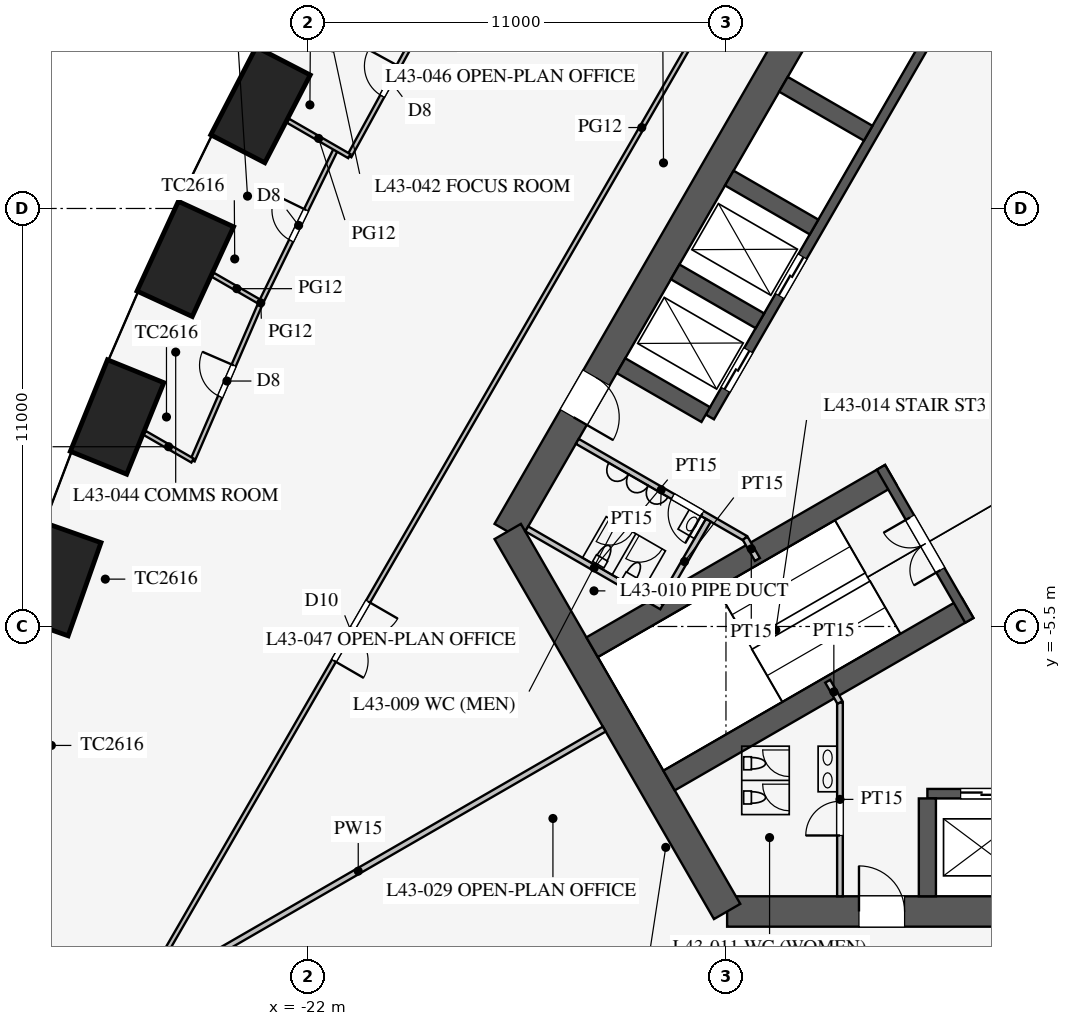
"""IFC4 building model, lengths in metres.
Left out: names, types, materials, properties, quantities, classifications, styles, units other than length and angle.
Written with IfcOpenShell. Run it as: python <this file> out.ifc"""

import sys

from ifc_helpers import new_model, si_unit, direction, frame, frame_2d, origin, origin_2d, place, context, subcontext, project, spatial, rectangle, extrude, element, fill, save


model = new_model("IFC4")
c1 = context("Model", 3, precision=1e-05, world=origin(), true_north=direction((0.0, 1.0)))
c2 = subcontext(c1, "Body", "Model", "MODEL_VIEW")
j1 = project(units=[si_unit("LENGTHUNIT", "METRE"), si_unit("PLANEANGLEUNIT", "RADIAN")], contexts=[c1])
p1 = place(None, origin())
s1 = spatial("IfcSite", under=j1, at=p1, CompositionType="ELEMENT")
p2 = place(p1, origin())
s2 = spatial("IfcBuilding", under=s1, at=p2, CompositionType="ELEMENT")
p3 = place(p2, frame((0.0, 0.0, 189.7)))
s3 = spatial("IfcBuildingStorey", under=s2, at=p3, CompositionType="ELEMENT", Elevation=189.7)
for number, where, z_axis, x_axis in (
    (1, (-23.248, 8.226, 0.0), (0.0, 0.0, 1.0), (-0.46, -0.888, 0.0)),
    (2, (-25.227, 4.172, 0.0), (0.0, 0.0, 1.0), (-0.418, -0.908, 0.0)),
    (3, (-27.022, 0.013, 0.0), (0.0, 0.0, 1.0), (-0.376, -0.927, 0.0)),
    (4, (-28.632, -4.254, 0.0), (0.0, 0.0, 1.0), (-0.332, -0.943, 0.0)),
):
    element("IfcColumn", number, at=place(p3, frame(where, z_axis=z_axis, x_axis=x_axis)), inside=s3, PredefinedType="COLUMN", context=c2, shape_type="SweptSolid", body=[
        extrude(rectangle(XDim=2.6, YDim=1.6, at=origin_2d()), origin(), (0.0, 0.0, 1.0), 4.2),
    ])
p4 = place(p3, frame((-10.97, -13.0, 0.0), z_axis=(0.0, 0.0, 1.0), x_axis=(1.0, 0.0, 0.0)))
e5 = element("IfcWall", 5, at=p4, inside=s3, PredefinedType="SHEAR", context=c2, shape_type="SweptSolid", body=[
    extrude(rectangle(XDim=21.939, YDim=0.8, at=frame_2d((10.97, 0.0))), origin(), (0.0, 0.0, 1.0), 4.2),
])
p5 = place(p4, frame((17.27, 0.0, 0.0)))
e6 = element("IfcOpeningElement", 6, at=p5, cuts=e5, PredefinedType="OPENING", context=c2, shape_type="SweptSolid", body=[
    extrude(rectangle(XDim=1.2, YDim=2.1, at=frame_2d((0.6, 1.05))), frame((0.0, 0.41, 0.0), z_axis=(0.0, -1.0, 0.0), x_axis=(1.0, 0.0, 0.0)), (0.0, 0.0, 1.0), 0.82),
])
p6 = place(p4, frame((3.47, 0.0, 0.0)))
e7 = element("IfcOpeningElement", 7, at=p6, cuts=e5, PredefinedType="OPENING", context=c2, shape_type="SweptSolid", body=[
    extrude(rectangle(XDim=1.2, YDim=2.1, at=frame_2d((0.6, 1.05))), frame((0.0, 0.41, 0.0), z_axis=(0.0, -1.0, 0.0), x_axis=(1.0, 0.0, 0.0)), (0.0, 0.0, 1.0), 0.82),
])
p7 = place(p3, frame((-5.773, 16.0, 0.0), z_axis=(0.0, 0.0, 1.0), x_axis=(-0.500002442456, -0.866023993627, 0.0)))
e8 = element("IfcWall", 8, at=p7, inside=s3, PredefinedType="SHEAR", context=c2, shape_type="SweptSolid", body=[
    extrude(rectangle(XDim=21.939, YDim=0.8, at=frame_2d((10.97, 0.0))), origin(), (0.0, 0.0, 1.0), 4.2),
])
p8 = place(p7, frame((17.27, 0.0, 0.0)))
e9 = element("IfcOpeningElement", 9, at=p8, cuts=e8, PredefinedType="OPENING", context=c2, shape_type="SweptSolid", body=[
    extrude(rectangle(XDim=1.2, YDim=2.1, at=frame_2d((0.6, 1.05))), frame((0.0, 0.41, 0.0), z_axis=(0.0, -1.0, 0.0), x_axis=(1.0, 0.0, 0.0)), (0.0, 0.0, 1.0), 0.82),
])
p9 = place(p7, frame((3.47, 0.0, 0.0)))
e10 = element("IfcOpeningElement", 10, at=p9, cuts=e8, PredefinedType="OPENING", context=c2, shape_type="SweptSolid", body=[
    extrude(rectangle(XDim=1.2, YDim=2.1, at=frame_2d((0.6, 1.05))), frame((0.0, 0.41, 0.0), z_axis=(0.0, -1.0, 0.0), x_axis=(1.0, 0.0, 0.0)), (0.0, 0.0, 1.0), 0.82),
])
p10 = place(p3, frame((-16.743, -3.0, 0.0), z_axis=(0.0, 0.0, 1.0), x_axis=(0.499995765644, -0.866027848477, 0.0)))
e11 = element("IfcWall", 11, at=p10, inside=s3, PredefinedType="SHEAR", context=c2, shape_type="SweptSolid", body=[
    extrude(rectangle(XDim=11.547, YDim=0.8, at=frame_2d((5.773, 0.0))), origin(), (0.0, 0.0, 1.0), 4.2),
])
p11 = place(p3, frame((-5.7, -9.9, 0.0), z_axis=(0.0, 0.0, 1.0), x_axis=(1.0, 0.0, 0.0)))
e12 = element("IfcWall", 12, at=p11, inside=s3, PredefinedType="SHEAR", context=c2, shape_type="SweptSolid", body=[
    extrude(rectangle(XDim=11.4, YDim=0.25, at=frame_2d((5.7, 0.0))), origin(), (0.0, 0.0, 1.0), 4.2),
])
p12 = place(p11, frame((0.875, 0.0, 0.0)))
e13 = element("IfcOpeningElement", 13, at=p12, cuts=e12, PredefinedType="OPENING", context=c2, shape_type="SweptSolid", body=[
    extrude(rectangle(XDim=1.1, YDim=2.2, at=frame_2d((0.55, 1.1))), frame((0.0, 0.135, 0.0), z_axis=(0.0, -1.0, 0.0), x_axis=(1.0, 0.0, 0.0)), (0.0, 0.0, 1.0), 0.27),
])
p13 = place(p11, frame((3.725, 0.0, 0.0)))
e14 = element("IfcOpeningElement", 14, at=p13, cuts=e12, PredefinedType="OPENING", context=c2, shape_type="SweptSolid", body=[
    extrude(rectangle(XDim=1.1, YDim=2.2, at=frame_2d((0.55, 1.1))), frame((0.0, 0.135, 0.0), z_axis=(0.0, -1.0, 0.0), x_axis=(1.0, 0.0, 0.0)), (0.0, 0.0, 1.0), 0.27),
])
p14 = place(p11, frame((6.575, 0.0, 0.0)))
e15 = element("IfcOpeningElement", 15, at=p14, cuts=e12, PredefinedType="OPENING", context=c2, shape_type="SweptSolid", body=[
    extrude(rectangle(XDim=1.1, YDim=2.2, at=frame_2d((0.55, 1.1))), frame((0.0, 0.135, 0.0), z_axis=(0.0, -1.0, 0.0), x_axis=(1.0, 0.0, 0.0)), (0.0, 0.0, 1.0), 0.27),
])
p15 = place(p11, frame((9.425, 0.0, 0.0)))
e16 = element("IfcOpeningElement", 16, at=p15, cuts=e12, PredefinedType="OPENING", context=c2, shape_type="SweptSolid", body=[
    extrude(rectangle(XDim=1.1, YDim=2.2, at=frame_2d((0.55, 1.1))), frame((0.0, 0.135, 0.0), z_axis=(0.0, -1.0, 0.0), x_axis=(1.0, 0.0, 0.0)), (0.0, 0.0, 1.0), 0.27),
])
p16 = place(p3, frame((-5.7, -10.025, 0.0), z_axis=(0.0, 0.0, 1.0), x_axis=(0.0, -1.0, 0.0)))
e17 = element("IfcWall", 17, at=p16, inside=s3, PredefinedType="SHEAR", context=c2, shape_type="SweptSolid", body=[
    extrude(rectangle(XDim=2.575, YDim=0.45, at=frame_2d((1.288, 0.0))), origin(), (0.0, 0.0, 1.0), 4.2),
])
p17 = place(p3, frame((-5.724, 9.886, 0.0), z_axis=(0.0, 0.0, 1.0), x_axis=(-0.500001763848, -0.866024385424, 0.0)))
e18 = element("IfcWall", 18, at=p17, inside=s3, PredefinedType="SHEAR", context=c2, shape_type="SweptSolid", body=[
    extrude(rectangle(XDim=11.4, YDim=0.25, at=frame_2d((5.7, 0.0))), origin(), (0.0, 0.0, 1.0), 4.2),
])
p18 = place(p17, frame((6.525, 0.0, 0.0)))
e19 = element("IfcOpeningElement", 19, at=p18, cuts=e18, PredefinedType="OPENING", context=c2, shape_type="SweptSolid", body=[
    extrude(rectangle(XDim=1.2, YDim=2.2, at=frame_2d((0.6, 1.1))), frame((0.0, 0.135, 0.0), z_axis=(0.0, -1.0, 0.0), x_axis=(1.0, 0.0, 0.0)), (0.0, 0.0, 1.0), 0.27),
])
p19 = place(p17, frame((9.375, 0.0, 0.0)))
e20 = element("IfcOpeningElement", 20, at=p19, cuts=e18, PredefinedType="OPENING", context=c2, shape_type="SweptSolid", body=[
    extrude(rectangle(XDim=1.2, YDim=2.2, at=frame_2d((0.6, 1.1))), frame((0.0, 0.135, 0.0), z_axis=(0.0, -1.0, 0.0), x_axis=(1.0, 0.0, 0.0)), (0.0, 0.0, 1.0), 0.27),
])
for number, where, z_axis, x_axis in (
    (21, (-7.257, 7.481, 0.0), (0.0, 0.0, 1.0), (-0.866, 0.5, 0.0)),
    (22, (-8.682, 5.012, 0.0), (0.0, 0.0, 1.0), (-0.866, 0.5, 0.0)),
    (23, (-10.107, 2.544, 0.0), (0.0, 0.0, 1.0), (-0.866, 0.5, 0.0)),
    (24, (-11.532, 0.076, 0.0), (0.0, 0.0, 1.0), (-0.866, 0.5, 0.0)),
):
    element("IfcWall", number, at=place(p3, frame(where, z_axis=z_axis, x_axis=x_axis)), inside=s3, PredefinedType="SHEAR", context=c2, shape_type="SweptSolid", body=[
        extrude(rectangle(XDim=2.575, YDim=0.45, at=frame_2d((1.288, 0.0))), origin(), (0.0, 0.0, 1.0), 4.2),
    ])
for number, where, z_axis, x_axis in (
    (25, (-6.663, -1.509, 0.0), (0.0, 0.0, 1.0), (-0.866, -0.5, 0.0)),
    (26, (-4.638, -5.016, 0.0), (0.0, 0.0, 1.0), (-0.866, -0.5, 0.0)),
):
    element("IfcWall", number, at=place(p3, frame(where, z_axis=z_axis, x_axis=x_axis)), inside=s3, PredefinedType="SHEAR", context=c2, shape_type="SweptSolid", body=[
        extrude(rectangle(XDim=9.075, YDim=0.6, at=frame_2d((4.538, 0.0))), origin(), (0.0, 0.0, 1.0), 4.2),
    ])
p20 = place(p3, frame((-6.922, -1.312, 0.0), z_axis=(0.0, 0.0, 1.0), x_axis=(0.499984536904, -0.866034331223, 0.0)))
e27 = element("IfcWall", 27, at=p20, inside=s3, PredefinedType="SHEAR", context=c2, shape_type="SweptSolid", body=[
    extrude(rectangle(XDim=4.65, YDim=0.25, at=frame_2d((2.325, 0.0))), origin(), (0.0, 0.0, 1.0), 4.2),
])
p21 = place(p20, frame((1.525, 0.0, 0.0)))
e28 = element("IfcOpeningElement", 28, at=p21, cuts=e27, PredefinedType="OPENING", context=c2, shape_type="SweptSolid", body=[
    extrude(rectangle(XDim=1.6, YDim=2.1, at=frame_2d((0.8, 1.05))), frame((0.0, 0.135, 0.0), z_axis=(0.0, -1.0, 0.0), x_axis=(1.0, 0.0, 0.0)), (0.0, 0.0, 1.0), 0.27),
])
p22 = place(p3, frame((-8.0, -7.5, 0.0), z_axis=(0.0, 0.0, 1.0), x_axis=(0.0, -1.0, 0.0)))
e29 = element("IfcWall", 29, at=p22, inside=s3, PredefinedType="PARTITIONING", context=c2, shape_type="SweptSolid", body=[
    extrude(rectangle(XDim=5.1, YDim=0.15, at=frame_2d((2.55, 0.0))), origin(), (0.0, 0.0, 1.0), 4.0),
])
p23 = place(p22, frame((2.6, 0.0, 0.0)))
e30 = element("IfcOpeningElement", 30, at=p23, cuts=e29, PredefinedType="OPENING", context=c2, shape_type="SweptSolid", body=[
    extrude(rectangle(XDim=0.9, YDim=2.1, at=frame_2d((0.45, 1.05))), frame((0.0, 0.085, 0.0), z_axis=(0.0, -1.0, 0.0), x_axis=(1.0, 0.0, 0.0)), (0.0, 0.0, 1.0), 0.17),
])
p24 = place(p3, frame((-10.495, -3.178, 0.0), z_axis=(0.0, 0.0, 1.0), x_axis=(-0.86602216432, 0.500005610874, 0.0)))
e31 = element("IfcWall", 31, at=p24, inside=s3, PredefinedType="PARTITIONING", context=c2, shape_type="SweptSolid", body=[
    extrude(rectangle(XDim=5.1, YDim=0.15, at=frame_2d((2.55, 0.0))), origin(), (0.0, 0.0, 1.0), 4.0),
])
p25 = place(p24, frame((1.3, 0.0, 0.0)))
e32 = element("IfcOpeningElement", 32, at=p25, cuts=e31, PredefinedType="OPENING", context=c2, shape_type="SweptSolid", body=[
    extrude(rectangle(XDim=0.9, YDim=2.1, at=frame_2d((0.45, 1.05))), frame((0.0, 0.085, 0.0), z_axis=(0.0, -1.0, 0.0), x_axis=(1.0, 0.0, 0.0)), (0.0, 0.0, 1.0), 0.17),
])
for number, where, z_axis, x_axis in (
    (33, (-10.495, -3.178, 0.0), (0.0, 0.0, 1.0), (0.5, -0.866, 0.0)),
    (34, (-8.0, -7.5, 0.0), (0.0, 0.0, 1.0), (-0.5, 0.866, 0.0)),
):
    element("IfcWall", number, at=place(p3, frame(where, z_axis=z_axis, x_axis=x_axis)), inside=s3, PredefinedType="PARTITIONING", context=c2, shape_type="SweptSolid", body=[
        extrude(rectangle(XDim=0.645, YDim=0.15, at=frame_2d((0.323, 0.0))), origin(), (0.0, 0.0, 1.0), 4.0),
    ])
p26 = place(p3, frame((-12.691, -4.982, 0.0), z_axis=(0.0, 0.0, 1.0), x_axis=(-0.8660249478, 0.500000789788, 0.0)))
e35 = element("IfcWall", 35, at=p26, inside=s3, PredefinedType="PARTITIONING", context=c2, shape_type="SweptSolid", body=[
    extrude(rectangle(XDim=4.1, YDim=0.15, at=frame_2d((2.05, 0.0))), origin(), (0.0, 0.0, 1.0), 4.0),
])
p27 = place(p3, frame((-11.464, -2.706, 0.0), z_axis=(0.0, 0.0, 1.0), x_axis=(-0.50001992892, -0.866013897511, 0.0)))
e36 = element("IfcWall", 36, at=p27, inside=s3, PredefinedType="PARTITIONING", context=c2, shape_type="SweptSolid", body=[
    extrude(rectangle(XDim=2.51, YDim=0.15, at=frame_2d((1.255, 0.0))), origin(), (0.0, 0.0, 1.0), 4.0),
])
p28 = place(p3, frame((-14.203, -8.2, 0.0), z_axis=(0.0, 0.0, 1.0), x_axis=(-0.866021600284, -0.500006587798, 0.0)))
e37 = element("IfcWall", 37, at=p28, inside=s3, PredefinedType="PARTITIONING", context=c2, shape_type="SweptSolid", body=[
    extrude(rectangle(XDim=14.95, YDim=0.15, at=frame_2d((7.475, 0.0))), origin(), (0.0, 0.0, 1.0), 2.4),
])
p29 = place(p3, frame((-0.016, 30.491, 0.0), z_axis=(0.0, 0.0, 1.0), x_axis=(-0.50000091641, -0.866024874695, 0.0)))
e38 = element("IfcWall", 38, at=p29, inside=s3, PredefinedType="PARTITIONING", context=c2, shape_type="SweptSolid", body=[
    extrude(rectangle(XDim=52.796, YDim=0.12, at=frame_2d((26.398, 0.0))), origin(), (0.0, 0.0, 1.0), 2.9),
])
p30 = place(p29, frame((10.2, 0.0, 0.15)))
e39 = element("IfcOpeningElement", 39, at=p30, cuts=e38, PredefinedType="OPENING", context=c2, shape_type="SweptSolid", body=[
    extrude(rectangle(XDim=1.8, YDim=2.1, at=frame_2d((0.9, 1.05))), frame((0.0, 0.07, 0.0), z_axis=(0.0, -1.0, 0.0), x_axis=(1.0, 0.0, 0.0)), (0.0, 0.0, 1.0), 0.14),
])
p31 = place(p29, frame((40.8, 0.0, 0.15)))
e40 = element("IfcOpeningElement", 40, at=p31, cuts=e38, PredefinedType="OPENING", context=c2, shape_type="SweptSolid", body=[
    extrude(rectangle(XDim=1.8, YDim=2.1, at=frame_2d((0.9, 1.05))), frame((0.0, 0.07, 0.0), z_axis=(0.0, -1.0, 0.0), x_axis=(1.0, 0.0, 0.0)), (0.0, 0.0, 1.0), 0.14),
])
p32 = place(p3, frame((-18.75, 10.825, 0.0), z_axis=(0.0, 0.0, 1.0), x_axis=(-0.479949984371, -0.877295852322, 0.0)))
e41 = element("IfcWall", 41, at=p32, inside=s3, PredefinedType="PARTITIONING", context=c2, shape_type="SweptSolid", body=[
    extrude(rectangle(XDim=4.501, YDim=0.12, at=frame_2d((2.25, 0.0))), origin(), (0.0, 0.0, 1.0), 2.9),
])
p33 = place(p32, frame((1.8, 0.0, 0.15)))
e42 = element("IfcOpeningElement", 42, at=p33, cuts=e41, PredefinedType="OPENING", context=c2, shape_type="SweptSolid", body=[
    extrude(rectangle(XDim=0.9, YDim=2.1, at=frame_2d((0.45, 1.05))), frame((0.0, 0.07, 0.0), z_axis=(0.0, -1.0, 0.0), x_axis=(1.0, 0.0, 0.0)), (0.0, 0.0, 1.0), 0.14),
])
p34 = place(p3, frame((-21.257, 7.076, 0.0), z_axis=(0.0, 0.0, 1.0), x_axis=(-0.43911984878, -0.898428493764, 0.0)))
e43 = element("IfcWall", 43, at=p34, inside=s3, PredefinedType="PARTITIONING", context=c2, shape_type="SweptSolid", body=[
    extrude(rectangle(XDim=4.511, YDim=0.12, at=frame_2d((2.255, 0.0))), origin(), (0.0, 0.0, 1.0), 2.9),
])
p35 = place(p34, frame((1.8, 0.0, 0.15)))
e44 = element("IfcOpeningElement", 44, at=p35, cuts=e43, PredefinedType="OPENING", context=c2, shape_type="SweptSolid", body=[
    extrude(rectangle(XDim=0.9, YDim=2.1, at=frame_2d((0.45, 1.05))), frame((0.0, 0.07, 0.0), z_axis=(0.0, -1.0, 0.0), x_axis=(1.0, 0.0, 0.0)), (0.0, 0.0, 1.0), 0.14),
])
p36 = place(p3, frame((-23.238, 3.024, 0.0), z_axis=(0.0, 0.0, 1.0), x_axis=(-0.397253491631, -0.917708920839, 0.0)))
e45 = element("IfcWall", 45, at=p36, inside=s3, PredefinedType="PARTITIONING", context=c2, shape_type="SweptSolid", body=[
    extrude(rectangle(XDim=4.53, YDim=0.12, at=frame_2d((2.265, 0.0))), origin(), (0.0, 0.0, 1.0), 2.9),
])
p37 = place(p36, frame((1.8, 0.0, 0.15)))
e46 = element("IfcOpeningElement", 46, at=p37, cuts=e45, PredefinedType="OPENING", context=c2, shape_type="SweptSolid", body=[
    extrude(rectangle(XDim=0.9, YDim=2.1, at=frame_2d((0.45, 1.05))), frame((0.0, 0.07, 0.0), z_axis=(0.0, -1.0, 0.0), x_axis=(1.0, 0.0, 0.0)), (0.0, 0.0, 1.0), 0.14),
])
p38 = place(p3, frame((-25.037, -1.133, 0.0), z_axis=(0.0, 0.0, 1.0), x_axis=(-0.865992696156, 0.500056646995, 0.0)))
e47 = element("IfcWall", 47, at=p38, inside=s3, PredefinedType="PARTITIONING", context=c2, shape_type="SweptSolid", body=[
    extrude(rectangle(XDim=1.454, YDim=0.12, at=frame_2d((0.727, 0.0))), origin(), (0.0, 0.0, 1.0), 2.2),
])
p39 = place(p3, frame((-20.91, 6.876, 0.0), z_axis=(0.0, 0.0, 1.0), x_axis=(-0.866031075672, 0.499990175874, 0.0)))
e48 = element("IfcWall", 48, at=p39, inside=s3, PredefinedType="PARTITIONING", context=c2, shape_type="SweptSolid", body=[
    extrude(rectangle(XDim=1.868, YDim=0.12, at=frame_2d((0.934, 0.0))), origin(), (0.0, 0.0, 1.0), 2.6),
])
p40 = place(p3, frame((-23.238, 3.024, 0.0), z_axis=(0.0, 0.0, 1.0), x_axis=(-0.865985511038, 0.5000690899, 0.0)))
e49 = element("IfcWall", 49, at=p40, inside=s3, PredefinedType="PARTITIONING", context=c2, shape_type="SweptSolid", body=[
    extrude(rectangle(XDim=1.463, YDim=0.12, at=frame_2d((0.731, 0.0))), origin(), (0.0, 0.0, 1.0), 2.6),
])
p41 = place(p23, frame((0.9, 0.0, 0.0), z_axis=(0.0, 0.0, 1.0), x_axis=(-1.0, 0.0, 0.0)))
e50 = element("IfcDoor", 50, at=p41, inside=s3, OperationType="SINGLE_SWING_LEFT", PredefinedType="DOOR", context=c2, shape_type="SweptSolid", body=[
    extrude(rectangle(XDim=0.9, YDim=2.1, at=frame_2d((0.45, 1.05))), frame((0.0, 0.025, 0.0), z_axis=(0.0, -1.0, 0.0), x_axis=(1.0, 0.0, 0.0)), (0.0, 0.0, 1.0), 0.05),
])
fill(e30, e50)
p42 = place(p25, origin())
e51 = element("IfcDoor", 51, at=p42, inside=s3, OperationType="SINGLE_SWING_LEFT", PredefinedType="DOOR", context=c2, shape_type="SweptSolid", body=[
    extrude(rectangle(XDim=0.9, YDim=2.1, at=frame_2d((0.45, 1.05))), frame((0.0, 0.025, 0.0), z_axis=(0.0, -1.0, 0.0), x_axis=(1.0, 0.0, 0.0)), (0.0, 0.0, 1.0), 0.05),
])
fill(e32, e51)
p43 = place(p21, frame((1.6, 0.0, 0.0), z_axis=(0.0, 0.0, 1.0), x_axis=(-1.0, 0.0, 0.0)))
e52 = element("IfcDoor", 52, at=p43, inside=s3, OperationType="DOUBLE_DOOR_SINGLE_SWING", PredefinedType="DOOR", context=c2, shape_type="SweptSolid", body=[
    extrude(rectangle(XDim=1.6, YDim=2.1, at=frame_2d((0.8, 1.05))), frame((0.0, 0.025, 0.0), z_axis=(0.0, -1.0, 0.0), x_axis=(1.0, 0.0, 0.0)), (0.0, 0.0, 1.0), 0.05),
])
fill(e28, e52)
p44 = place(p6, origin())
e53 = element("IfcDoor", 53, at=p44, inside=s3, OperationType="SINGLE_SWING_LEFT", PredefinedType="DOOR", context=c2, shape_type="SweptSolid", body=[
    extrude(rectangle(XDim=1.2, YDim=2.1, at=frame_2d((0.6, 1.05))), frame((0.0, 0.025, 0.0), z_axis=(0.0, -1.0, 0.0), x_axis=(1.0, 0.0, 0.0)), (0.0, 0.0, 1.0), 0.05),
])
fill(e7, e53)
p45 = place(p8, origin())
e54 = element("IfcDoor", 54, at=p45, inside=s3, OperationType="SINGLE_SWING_RIGHT", PredefinedType="DOOR", context=c2, shape_type="SweptSolid", body=[
    extrude(rectangle(XDim=1.2, YDim=2.1, at=frame_2d((0.6, 1.05))), frame((0.0, 0.025, 0.0), z_axis=(0.0, -1.0, 0.0), x_axis=(1.0, 0.0, 0.0)), (0.0, 0.0, 1.0), 0.05),
])
fill(e9, e54)
p46 = place(p33, frame((0.9, 0.0, 0.0), z_axis=(0.0, 0.0, 1.0), x_axis=(-1.0, 0.0, 0.0)))
e55 = element("IfcDoor", 55, at=p46, inside=s3, OperationType="SINGLE_SWING_RIGHT", PredefinedType="DOOR", context=c2, shape_type="SweptSolid", body=[
    extrude(rectangle(XDim=0.9, YDim=2.1, at=frame_2d((0.45, 1.05))), frame((0.0, 0.025, 0.0), z_axis=(0.0, -1.0, 0.0), x_axis=(1.0, 0.0, 0.0)), (0.0, 0.0, 1.0), 0.05),
])
fill(e42, e55)
p47 = place(p35, frame((0.9, 0.0, 0.0), z_axis=(0.0, 0.0, 1.0), x_axis=(-1.0, 0.0, 0.0)))
e56 = element("IfcDoor", 56, at=p47, inside=s3, OperationType="SINGLE_SWING_RIGHT", PredefinedType="DOOR", context=c2, shape_type="SweptSolid", body=[
    extrude(rectangle(XDim=0.9, YDim=2.1, at=frame_2d((0.45, 1.05))), frame((0.0, 0.025, 0.0), z_axis=(0.0, -1.0, 0.0), x_axis=(1.0, 0.0, 0.0)), (0.0, 0.0, 1.0), 0.05),
])
fill(e44, e56)
p48 = place(p37, frame((0.9, 0.0, 0.0), z_axis=(0.0, 0.0, 1.0), x_axis=(-1.0, 0.0, 0.0)))
e57 = element("IfcDoor", 57, at=p48, inside=s3, OperationType="SINGLE_SWING_RIGHT", PredefinedType="DOOR", context=c2, shape_type="SweptSolid", body=[
    extrude(rectangle(XDim=0.9, YDim=2.1, at=frame_2d((0.45, 1.05))), frame((0.0, 0.025, 0.0), z_axis=(0.0, -1.0, 0.0), x_axis=(1.0, 0.0, 0.0)), (0.0, 0.0, 1.0), 0.05),
])
fill(e46, e57)
p49 = place(p31, origin())
e58 = element("IfcDoor", 58, at=p49, inside=s3, OperationType="DOUBLE_DOOR_SINGLE_SWING", PredefinedType="DOOR", context=c2, shape_type="SweptSolid", body=[
    extrude(rectangle(XDim=1.8, YDim=2.1, at=frame_2d((0.9, 1.05))), frame((0.0, 0.025, 0.0), z_axis=(0.0, -1.0, 0.0), x_axis=(1.0, 0.0, 0.0)), (0.0, 0.0, 1.0), 0.05),
])
fill(e40, e58)
p50 = place(p12, origin())
e59 = element("IfcDoor", 59, at=p50, inside=s3, OperationType="DOUBLE_DOOR_SLIDING", PredefinedType="DOOR", context=c2, shape_type="SweptSolid", body=[
    extrude(rectangle(XDim=1.1, YDim=2.2, at=frame_2d((0.55, 1.1))), frame((0.0, 0.025, 0.0), z_axis=(0.0, -1.0, 0.0), x_axis=(1.0, 0.0, 0.0)), (0.0, 0.0, 1.0), 0.05),
])
fill(e13, e59)
p51 = place(p18, origin())
e60 = element("IfcDoor", 60, at=p51, inside=s3, OperationType="DOUBLE_DOOR_SLIDING", PredefinedType="DOOR", context=c2, shape_type="SweptSolid", body=[
    extrude(rectangle(XDim=1.2, YDim=2.2, at=frame_2d((0.6, 1.1))), frame((0.0, 0.025, 0.0), z_axis=(0.0, -1.0, 0.0), x_axis=(1.0, 0.0, 0.0)), (0.0, 0.0, 1.0), 0.05),
])
fill(e19, e60)
p52 = place(p19, origin())
e61 = element("IfcDoor", 61, at=p52, inside=s3, OperationType="DOUBLE_DOOR_SLIDING", PredefinedType="DOOR", context=c2, shape_type="SweptSolid", body=[
    extrude(rectangle(XDim=1.2, YDim=2.2, at=frame_2d((0.6, 1.1))), frame((0.0, 0.025, 0.0), z_axis=(0.0, -1.0, 0.0), x_axis=(1.0, 0.0, 0.0)), (0.0, 0.0, 1.0), 0.05),
])
fill(e20, e61)
save(model, sys.argv[1])
